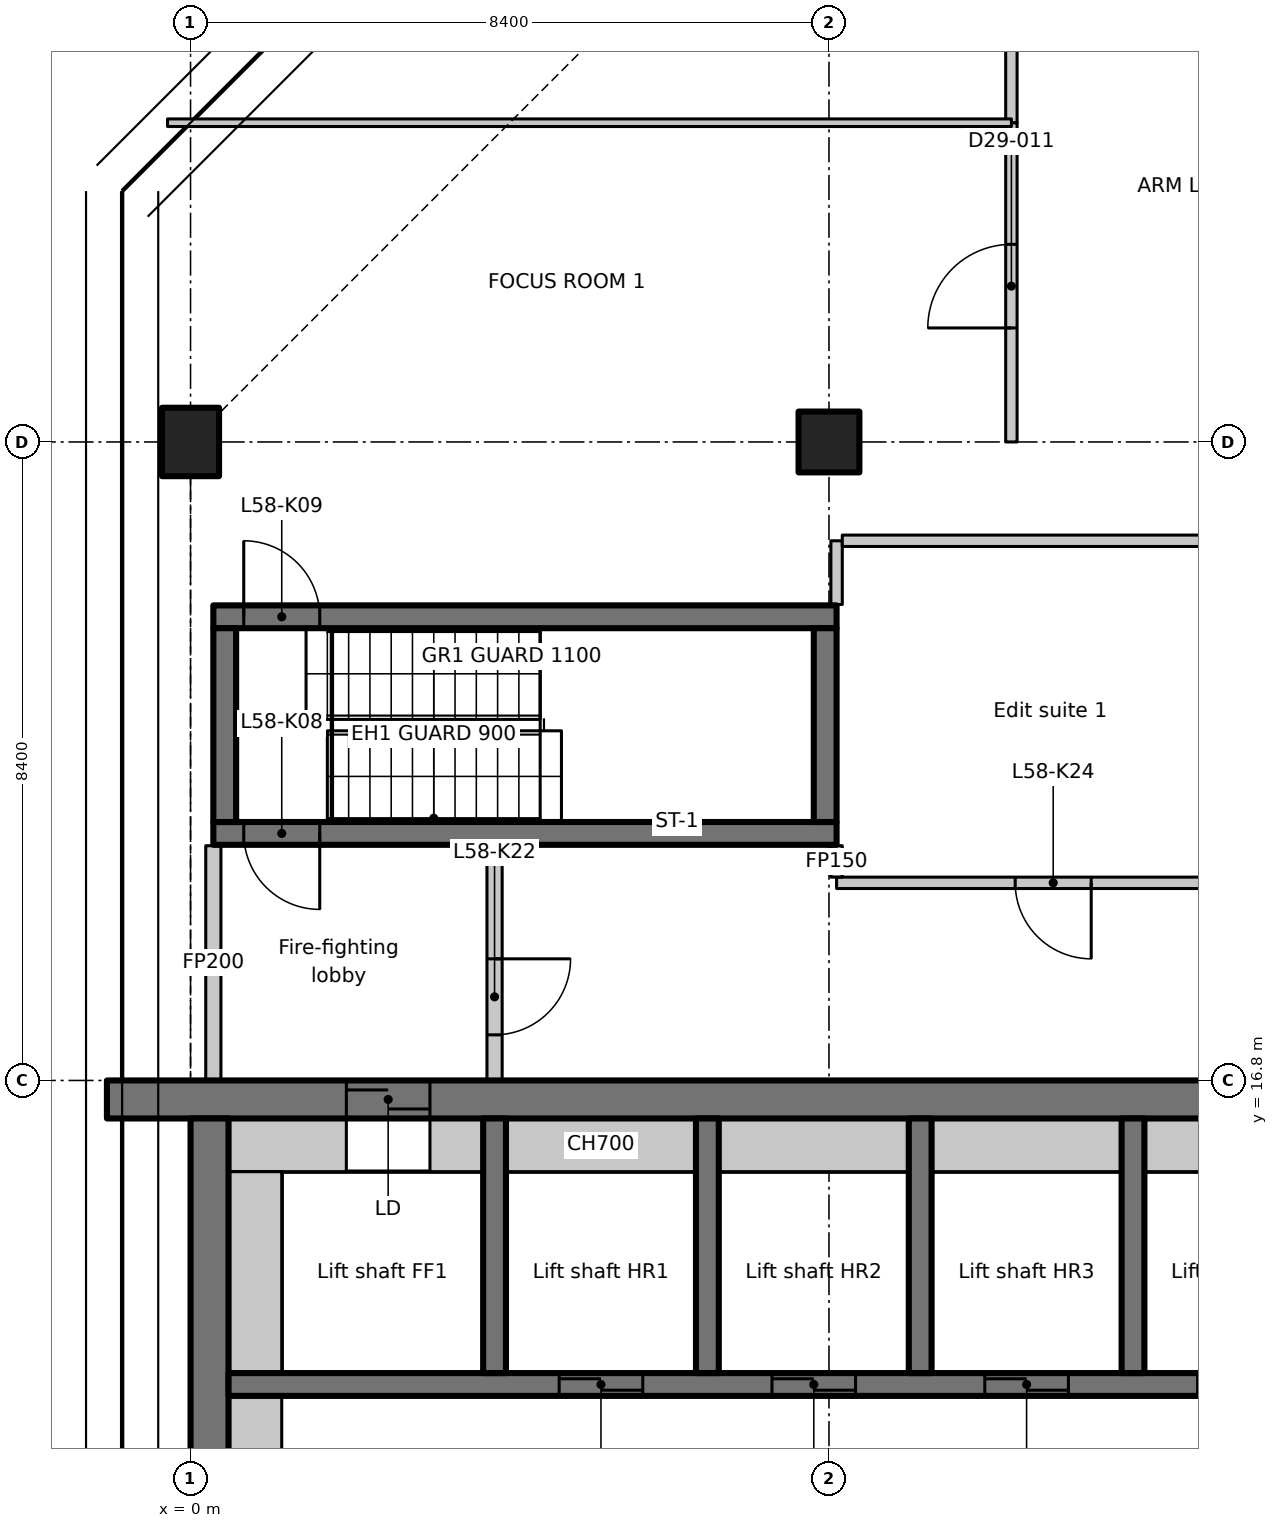
"""IFC4 building model, lengths in metres.
Left out: names, types, materials, properties, quantities, classifications, styles, units other than length and angle.
Written with IfcOpenShell. Run it as: python <this file> out.ifc"""

import sys

from ifc_helpers import new_model, si_unit, direction, frame, frame_2d, origin, origin_2d, place, context, subcontext, project, spatial, polyline, rectangle, outline, extrude, element, fill, save


model = new_model("IFC4")
c1 = context("Model", 3, precision=1e-05, world=origin(), true_north=direction((0.0, 1.0)))
c2 = subcontext(c1, "Body", "Model", "MODEL_VIEW")
j1 = project(units=[si_unit("LENGTHUNIT", "METRE"), si_unit("PLANEANGLEUNIT", "RADIAN")], contexts=[c1])
p1 = place(None, origin())
s1 = spatial("IfcSite", under=j1, at=p1, CompositionType="ELEMENT")
p2 = place(p1, origin())
s2 = spatial("IfcBuilding", under=s1, at=p2, CompositionType="ELEMENT")
p3 = place(p2, frame((0.0, 0.0, 230.1)))
s3 = spatial("IfcBuildingStorey", under=s2, at=p3, CompositionType="ELEMENT", Elevation=230.1)
p4 = place(p3, frame((0.0, 25.2, 0.0), z_axis=(0.0, 0.0, 1.0), x_axis=(1.0, 0.0, 0.0)))
e1 = element("IfcColumn", 1, at=p4, inside=s3, PredefinedType="COLUMN", context=c2, shape_type="SweptSolid", body=[
    extrude(rectangle(XDim=0.75, YDim=0.9, at=origin_2d()), origin(), (0.0, 0.0, 1.0), 3.35),
])
p5 = place(p3, frame((8.4, 25.2, 0.0), z_axis=(0.0, 0.0, 1.0), x_axis=(1.0, 0.0, 0.0)))
e2 = element("IfcColumn", 2, at=p5, inside=s3, PredefinedType="COLUMN", context=c2, shape_type="SweptSolid", body=[
    extrude(rectangle(XDim=0.8, YDim=0.8, at=origin_2d()), origin(), (0.0, 0.0, 1.0), 3.35),
])
p6 = place(p3, frame((-1.1, 16.55, 0.0), z_axis=(0.0, 0.0, 1.0), x_axis=(1.0, 0.0, 0.0)))
e3 = element("IfcWall", 3, at=p6, inside=s3, PredefinedType="SHEAR", context=c2, shape_type="SweptSolid", body=[
    extrude(rectangle(XDim=22.1, YDim=0.5, at=frame_2d((11.05, 0.0))), origin(), (0.0, 0.0, 1.0), 3.35),
])
p7 = place(p6, frame((3.15, 0.0, 0.0)))
e4 = element("IfcOpeningElement", 4, at=p7, cuts=e3, PredefinedType="OPENING", context=c2, shape_type="SweptSolid", body=[
    extrude(rectangle(XDim=1.1, YDim=2.3, at=frame_2d((0.55, 1.15))), frame((0.0, 0.26, 0.0), z_axis=(0.0, -1.0, 0.0), x_axis=(1.0, 0.0, 0.0)), (0.0, 0.0, 1.0), 0.52),
])
p8 = place(p3, frame((0.25, 7.436, 0.0), z_axis=(0.0, 0.0, 1.0), x_axis=(0.0, 1.0, 0.0)))
e5 = element("IfcWall", 5, at=p8, inside=s3, PredefinedType="SHEAR", context=c2, shape_type="SweptSolid", body=[
    extrude(rectangle(XDim=8.864, YDim=0.5, at=frame_2d((4.432, 0.0))), origin(), (0.0, 0.0, 1.0), 3.35),
])
p9 = place(p3, frame((0.5, 15.95, 0.0), z_axis=(0.0, 0.0, 1.0), x_axis=(1.0, 0.0, 0.0)))
e6 = element("IfcWall", 6, at=p9, inside=s3, PredefinedType="PARTITIONING", context=c2, shape_type="SweptSolid", body=[
    extrude(rectangle(XDim=1.55, YDim=0.7, at=frame_2d((0.775, 0.0))), origin(), (0.0, 0.0, 1.0), 3.35),
])
p10 = place(p3, frame((0.5, 12.8, 0.0), z_axis=(0.0, 0.0, 1.0), x_axis=(1.0, 0.0, 0.0)))
e7 = element("IfcWall", 7, at=p10, inside=s3, PredefinedType="SHEAR", context=c2, shape_type="SweptSolid", body=[
    extrude(rectangle(XDim=14.85, YDim=0.3, at=frame_2d((7.425, 0.0))), origin(), (0.0, 0.0, 1.0), 3.35),
])
p11 = place(p10, frame((4.35, 0.0, 0.0)))
e8 = element("IfcOpeningElement", 8, at=p11, cuts=e7, PredefinedType="OPENING", context=c2, shape_type="SweptSolid", body=[
    extrude(rectangle(XDim=1.1, YDim=2.3, at=frame_2d((0.55, 1.15))), frame((0.0, 0.16, 0.0), z_axis=(0.0, -1.0, 0.0), x_axis=(1.0, 0.0, 0.0)), (0.0, 0.0, 1.0), 0.32),
])
p12 = place(p10, frame((7.15, 0.0, 0.0)))
e9 = element("IfcOpeningElement", 9, at=p12, cuts=e7, PredefinedType="OPENING", context=c2, shape_type="SweptSolid", body=[
    extrude(rectangle(XDim=1.1, YDim=2.3, at=frame_2d((0.55, 1.15))), frame((0.0, 0.16, 0.0), z_axis=(0.0, -1.0, 0.0), x_axis=(1.0, 0.0, 0.0)), (0.0, 0.0, 1.0), 0.32),
])
p13 = place(p10, frame((9.95, 0.0, 0.0)))
e10 = element("IfcOpeningElement", 10, at=p13, cuts=e7, PredefinedType="OPENING", context=c2, shape_type="SweptSolid", body=[
    extrude(rectangle(XDim=1.1, YDim=2.3, at=frame_2d((0.55, 1.15))), frame((0.0, 0.16, 0.0), z_axis=(0.0, -1.0, 0.0), x_axis=(1.0, 0.0, 0.0)), (0.0, 0.0, 1.0), 0.32),
])
p14 = place(p10, frame((12.75, 0.0, 0.0)))
e11 = element("IfcOpeningElement", 11, at=p14, cuts=e7, PredefinedType="OPENING", context=c2, shape_type="SweptSolid", body=[
    extrude(rectangle(XDim=1.1, YDim=2.3, at=frame_2d((0.55, 1.15))), frame((0.0, 0.16, 0.0), z_axis=(0.0, -1.0, 0.0), x_axis=(1.0, 0.0, 0.0)), (0.0, 0.0, 1.0), 0.32),
])
for number, where, z_axis, x_axis in (
    (12, (4.0, 12.95, 0.0), (0.0, 0.0, 1.0), (0.0, 1.0, 0.0)),
    (13, (6.8, 12.95, 0.0), (0.0, 0.0, 1.0), (0.0, 1.0, 0.0)),
    (14, (9.6, 12.95, 0.0), (0.0, 0.0, 1.0), (0.0, 1.0, 0.0)),
    (15, (12.4, 12.95, 0.0), (0.0, 0.0, 1.0), (0.0, 1.0, 0.0)),
):
    element("IfcWall", number, at=place(p3, frame(where, z_axis=z_axis, x_axis=x_axis)), inside=s3, PredefinedType="SHEAR", context=c2, shape_type="SweptSolid", body=[
        extrude(rectangle(XDim=3.35, YDim=0.3, at=frame_2d((1.675, 0.0))), origin(), (0.0, 0.0, 1.0), 3.35),
    ])
p15 = place(p3, frame((8.5, 20.05, 0.0), z_axis=(0.0, 0.0, 1.0), x_axis=(-1.0, 0.0, 0.0)))
e16 = element("IfcWall", 16, at=p15, inside=s3, PredefinedType="SHEAR", context=c2, shape_type="SweptSolid", body=[
    extrude(rectangle(XDim=8.2, YDim=0.3, at=frame_2d((4.1, 0.0))), origin(), (0.0, 0.0, 1.0), 3.35),
])
p16 = place(p15, frame((6.8, 0.0, 0.0)))
e17 = element("IfcOpeningElement", 17, at=p16, cuts=e16, PredefinedType="OPENING", context=c2, shape_type="SweptSolid", body=[
    extrude(rectangle(XDim=1.0, YDim=2.1, at=frame_2d((0.5, 1.05))), frame((0.0, 0.16, 0.0), z_axis=(0.0, -1.0, 0.0), x_axis=(1.0, 0.0, 0.0)), (0.0, 0.0, 1.0), 0.32),
])
p17 = place(p3, frame((0.3, 22.9, 0.0), z_axis=(0.0, 0.0, 1.0), x_axis=(1.0, 0.0, 0.0)))
e18 = element("IfcWall", 18, at=p17, inside=s3, PredefinedType="SHEAR", context=c2, shape_type="SweptSolid", body=[
    extrude(rectangle(XDim=8.2, YDim=0.3, at=frame_2d((4.1, 0.0))), origin(), (0.0, 0.0, 1.0), 3.35),
])
p18 = place(p17, frame((0.4, 0.0, 0.0)))
e19 = element("IfcOpeningElement", 19, at=p18, cuts=e18, PredefinedType="OPENING", context=c2, shape_type="SweptSolid", body=[
    extrude(rectangle(XDim=1.0, YDim=2.1, at=frame_2d((0.5, 1.05))), frame((0.0, 0.16, 0.0), z_axis=(0.0, -1.0, 0.0), x_axis=(1.0, 0.0, 0.0)), (0.0, 0.0, 1.0), 0.32),
])
for number, where, z_axis, x_axis in (
    (20, (0.45, 20.2, 0.0), (0.0, 0.0, 1.0), (0.0, 1.0, 0.0)),
    (21, (8.35, 20.2, 0.0), (0.0, 0.0, 1.0), (0.0, 1.0, 0.0)),
):
    element("IfcWall", number, at=place(p3, frame(where, z_axis=z_axis, x_axis=x_axis)), inside=s3, PredefinedType="SHEAR", context=c2, shape_type="SweptSolid", body=[
        extrude(rectangle(XDim=2.55, YDim=0.3, at=frame_2d((1.275, 0.0))), origin(), (0.0, 0.0, 1.0), 3.35),
    ])
p19 = place(p3, frame((0.3, 16.812, 0.0), z_axis=(0.0, 0.0, 1.0), x_axis=(0.0, 1.0, 0.0)))
e22 = element("IfcWall", 22, at=p19, inside=s3, PredefinedType="PARTITIONING", context=c2, shape_type="SweptSolid", body=[
    extrude(rectangle(XDim=3.076, YDim=0.2, at=frame_2d((1.538, 0.0))), origin(), (0.0, 0.0, 1.0), 2.98),
])
p20 = place(p3, frame((4.0, 19.888, 0.0), z_axis=(0.0, 0.0, 1.0), x_axis=(0.0, -1.0, 0.0)))
e23 = element("IfcWall", 23, at=p20, inside=s3, PredefinedType="PARTITIONING", context=c2, shape_type="SweptSolid", body=[
    extrude(rectangle(XDim=3.076, YDim=0.2, at=frame_2d((1.538, 0.0))), origin(), (0.0, 0.0, 1.0), 3.35),
])
p21 = place(p20, frame((1.488, 0.0, 0.0)))
e24 = element("IfcOpeningElement", 24, at=p21, cuts=e23, PredefinedType="OPENING", context=c2, shape_type="SweptSolid", body=[
    extrude(rectangle(XDim=1.0, YDim=2.1, at=frame_2d((0.5, 1.05))), frame((0.0, 0.11, 0.0), z_axis=(0.0, -1.0, 0.0), x_axis=(1.0, 0.0, 0.0)), (0.0, 0.0, 1.0), 0.22),
])
p22 = place(p3, frame((14.2, 19.4, 0.0), z_axis=(0.0, 0.0, 1.0), x_axis=(-1.0, 0.0, 0.0)))
e25 = element("IfcWall", 25, at=p22, inside=s3, PredefinedType="PARTITIONING", context=c2, shape_type="SweptSolid", body=[
    extrude(rectangle(XDim=5.7, YDim=0.15, at=frame_2d((2.85, 0.0))), origin(), (0.0, 0.0, 1.0), 3.35),
])
p23 = place(p22, frame((2.35, 0.0, 0.0)))
e26 = element("IfcOpeningElement", 26, at=p23, cuts=e25, PredefinedType="OPENING", context=c2, shape_type="SweptSolid", body=[
    extrude(rectangle(XDim=1.0, YDim=2.1, at=frame_2d((0.5, 1.05))), frame((0.0, 0.085, 0.0), z_axis=(0.0, -1.0, 0.0), x_axis=(1.0, 0.0, 0.0)), (0.0, 0.0, 1.0), 0.17),
])
p24 = place(p3, frame((8.5, 19.475, 0.0), z_axis=(0.0, 0.0, 1.0), x_axis=(0.0, 1.0, 0.0)))
e27 = element("IfcWall", 27, at=p24, inside=s3, PredefinedType="PARTITIONING", context=c2, shape_type="SweptSolid", body=[
    extrude(rectangle(XDim=0.413, YDim=0.15, at=frame_2d((0.207, 0.0))), origin(), (0.0, 0.0, 1.0), 3.35),
])
p25 = place(p3, frame((8.5, 23.062, 0.0), z_axis=(0.0, 0.0, 1.0), x_axis=(0.0, 1.0, 0.0)))
e28 = element("IfcWall", 28, at=p25, inside=s3, PredefinedType="PARTITIONING", context=c2, shape_type="SweptSolid", body=[
    extrude(rectangle(XDim=0.838, YDim=0.15, at=frame_2d((0.419, 0.0))), origin(), (0.0, 0.0, 1.0), 3.35),
])
p26 = place(p3, frame((8.575, 23.9, 0.0), z_axis=(0.0, 0.0, 1.0), x_axis=(1.0, 0.0, 0.0)))
e29 = element("IfcWall", 29, at=p26, inside=s3, PredefinedType="PARTITIONING", context=c2, shape_type="SweptSolid", body=[
    extrude(rectangle(XDim=5.625, YDim=0.15, at=frame_2d((2.812, 0.0))), origin(), (0.0, 0.0, 1.0), 3.35),
])
p27 = place(p3, frame((0.85, 7.436, 0.0), z_axis=(0.0, 0.0, 1.0), x_axis=(0.0, 1.0, 0.0)))
e30 = element("IfcWall", 30, at=p27, inside=s3, PredefinedType="PARTITIONING", context=c2, shape_type="SweptSolid", body=[
    extrude(rectangle(XDim=5.214, YDim=0.7, at=frame_2d((2.607, 0.0))), origin(), (0.0, 0.0, 1.0), 3.35),
])
p28 = place(p3, frame((0.85, 12.95, 0.0), z_axis=(0.0, 0.0, 1.0), x_axis=(0.0, 1.0, 0.0)))
e31 = element("IfcWall", 31, at=p28, inside=s3, PredefinedType="PARTITIONING", context=c2, shape_type="SweptSolid", body=[
    extrude(rectangle(XDim=2.65, YDim=0.7, at=frame_2d((1.325, 0.0))), origin(), (0.0, 0.0, 1.0), 3.35),
])
p29 = place(p3, frame((3.15, 15.95, 0.0), z_axis=(0.0, 0.0, 1.0), x_axis=(1.0, 0.0, 0.0)))
e32 = element("IfcWall", 32, at=p29, inside=s3, PredefinedType="PARTITIONING", context=c2, shape_type="SweptSolid", body=[
    extrude(rectangle(XDim=0.7, YDim=0.7, at=frame_2d((0.35, 0.0))), origin(), (0.0, 0.0, 1.0), 3.35),
])
for number, where, z_axis, x_axis in (
    (33, (4.15, 15.95, 0.0), (0.0, 0.0, 1.0), (1.0, 0.0, 0.0)),
    (34, (6.95, 15.95, 0.0), (0.0, 0.0, 1.0), (1.0, 0.0, 0.0)),
    (35, (9.75, 15.95, 0.0), (0.0, 0.0, 1.0), (1.0, 0.0, 0.0)),
    (36, (12.55, 15.95, 0.0), (0.0, 0.0, 1.0), (1.0, 0.0, 0.0)),
):
    element("IfcWall", number, at=place(p3, frame(where, z_axis=z_axis, x_axis=x_axis)), inside=s3, PredefinedType="PARTITIONING", context=c2, shape_type="SweptSolid", body=[
        extrude(rectangle(XDim=2.5, YDim=0.7, at=frame_2d((1.25, 0.0))), origin(), (0.0, 0.0, 1.0), 3.35),
    ])
p30 = place(p3, frame((10.8, 25.2, 0.0), z_axis=(0.0, 0.0, 1.0), x_axis=(0.0, 1.0, 0.0)))
e37 = element("IfcWall", 37, at=p30, inside=s3, PredefinedType="PARTITIONING", context=c2, shape_type="SweptSolid", body=[
    extrude(rectangle(XDim=4.2, YDim=0.15, at=frame_2d((2.1, 0.0))), origin(), (0.0, 0.0, 1.0), 3.33),
])
p31 = place(p30, frame((1.5, 0.0, 0.0)))
e38 = element("IfcOpeningElement", 38, at=p31, cuts=e37, PredefinedType="OPENING", context=c2, shape_type="SweptSolid", body=[
    extrude(rectangle(XDim=1.1, YDim=2.1, at=frame_2d((0.55, 1.05))), frame((0.0, 0.085, 0.0), z_axis=(0.0, -1.0, 0.0), x_axis=(1.0, 0.0, 0.0)), (0.0, 0.0, 1.0), 0.17),
])
p32 = place(p3, frame((10.8, 29.4, 0.0), z_axis=(0.0, 0.0, 1.0), x_axis=(0.0, 1.0, 0.0)))
e39 = element("IfcWall", 39, at=p32, inside=s3, PredefinedType="PARTITIONING", context=c2, shape_type="SweptSolid", body=[
    extrude(rectangle(XDim=4.2, YDim=0.15, at=frame_2d((2.1, 0.0))), origin(), (0.0, 0.0, 1.0), 2.98),
])
p33 = place(p32, frame((1.5, 0.0, 0.0)))
e40 = element("IfcOpeningElement", 40, at=p33, cuts=e39, PredefinedType="OPENING", context=c2, shape_type="SweptSolid", body=[
    extrude(rectangle(XDim=1.1, YDim=2.1, at=frame_2d((0.55, 1.05))), frame((0.0, 0.085, 0.0), z_axis=(0.0, -1.0, 0.0), x_axis=(1.0, 0.0, 0.0)), (0.0, 0.0, 1.0), 0.17),
])
p34 = place(p3, frame((-0.302, 29.4, 0.0), z_axis=(0.0, 0.0, 1.0), x_axis=(1.0, 0.0, 0.0)))
e41 = element("IfcWall", 41, at=p34, inside=s3, PredefinedType="PARTITIONING", context=c2, shape_type="SweptSolid", body=[
    extrude(outline(polyline([(0.0, 0.0), (11.103, 0.0), (11.103, 3.33), (5.168, 3.33), (5.166, 2.98), (3.839, 2.98), (3.837, 3.33), (0.103, 3.33), (0.0, 3.33), (0.0, 0.0)])), frame((0.0, 0.05, 0.0), z_axis=(0.0, -1.0, 0.0), x_axis=(1.0, 0.0, 0.0)), (0.0, 0.0, 1.0), 0.1),
])
p35 = place(p7, origin())
e42 = element("IfcDoor", 42, at=p35, inside=s3, OperationType="SLIDING_TO_LEFT", PredefinedType="DOOR", context=c2, shape_type="SweptSolid", body=[
    extrude(rectangle(XDim=1.1, YDim=2.3, at=frame_2d((0.55, 1.15))), frame((0.0, 0.025, 0.0), z_axis=(0.0, -1.0, 0.0), x_axis=(1.0, 0.0, 0.0)), (0.0, 0.0, 1.0), 0.05),
])
fill(e4, e42)
p36 = place(p11, origin())
e43 = element("IfcDoor", 43, at=p36, inside=s3, OperationType="SLIDING_TO_LEFT", PredefinedType="DOOR", context=c2, shape_type="SweptSolid", body=[
    extrude(rectangle(XDim=1.1, YDim=2.3, at=frame_2d((0.55, 1.15))), frame((0.0, 0.025, 0.0), z_axis=(0.0, -1.0, 0.0), x_axis=(1.0, 0.0, 0.0)), (0.0, 0.0, 1.0), 0.05),
])
fill(e8, e43)
p37 = place(p12, origin())
e44 = element("IfcDoor", 44, at=p37, inside=s3, OperationType="SLIDING_TO_LEFT", PredefinedType="DOOR", context=c2, shape_type="SweptSolid", body=[
    extrude(rectangle(XDim=1.1, YDim=2.3, at=frame_2d((0.55, 1.15))), frame((0.0, 0.025, 0.0), z_axis=(0.0, -1.0, 0.0), x_axis=(1.0, 0.0, 0.0)), (0.0, 0.0, 1.0), 0.05),
])
fill(e9, e44)
p38 = place(p13, origin())
e45 = element("IfcDoor", 45, at=p38, inside=s3, OperationType="SLIDING_TO_LEFT", PredefinedType="DOOR", context=c2, shape_type="SweptSolid", body=[
    extrude(rectangle(XDim=1.1, YDim=2.3, at=frame_2d((0.55, 1.15))), frame((0.0, 0.025, 0.0), z_axis=(0.0, -1.0, 0.0), x_axis=(1.0, 0.0, 0.0)), (0.0, 0.0, 1.0), 0.05),
])
fill(e10, e45)
p39 = place(p16, origin())
e46 = element("IfcDoor", 46, at=p39, inside=s3, OperationType="SINGLE_SWING_LEFT", PredefinedType="DOOR", context=c2, shape_type="SweptSolid", body=[
    extrude(rectangle(XDim=1.0, YDim=2.1, at=frame_2d((0.5, 1.05))), frame((0.0, 0.025, 0.0), z_axis=(0.0, -1.0, 0.0), x_axis=(1.0, 0.0, 0.0)), (0.0, 0.0, 1.0), 0.05),
])
fill(e17, e46)
p40 = place(p18, origin())
e47 = element("IfcDoor", 47, at=p40, inside=s3, OperationType="SINGLE_SWING_RIGHT", PredefinedType="DOOR", context=c2, shape_type="SweptSolid", body=[
    extrude(rectangle(XDim=1.0, YDim=2.1, at=frame_2d((0.5, 1.05))), frame((0.0, 0.025, 0.0), z_axis=(0.0, -1.0, 0.0), x_axis=(1.0, 0.0, 0.0)), (0.0, 0.0, 1.0), 0.05),
])
fill(e19, e47)
p41 = place(p21, origin())
e48 = element("IfcDoor", 48, at=p41, inside=s3, OperationType="SINGLE_SWING_LEFT", PredefinedType="DOOR", context=c2, shape_type="SweptSolid", body=[
    extrude(rectangle(XDim=1.0, YDim=2.1, at=frame_2d((0.5, 1.05))), frame((0.0, 0.025, 0.0), z_axis=(0.0, -1.0, 0.0), x_axis=(1.0, 0.0, 0.0)), (0.0, 0.0, 1.0), 0.05),
])
fill(e24, e48)
p42 = place(p23, origin())
e49 = element("IfcDoor", 49, at=p42, inside=s3, OperationType="SINGLE_SWING_LEFT", PredefinedType="DOOR", context=c2, shape_type="SweptSolid", body=[
    extrude(rectangle(XDim=1.0, YDim=2.1, at=frame_2d((0.5, 1.05))), frame((0.0, 0.025, 0.0), z_axis=(0.0, -1.0, 0.0), x_axis=(1.0, 0.0, 0.0)), (0.0, 0.0, 1.0), 0.05),
])
fill(e26, e49)
p43 = place(p31, origin())
e50 = element("IfcDoor", 50, at=p43, inside=s3, OperationType="SINGLE_SWING_LEFT", PredefinedType="DOOR", context=c2, shape_type="SweptSolid", body=[
    extrude(rectangle(XDim=1.1, YDim=2.1, at=frame_2d((0.55, 1.05))), frame((0.0, 0.025, 0.0), z_axis=(0.0, -1.0, 0.0), x_axis=(1.0, 0.0, 0.0)), (0.0, 0.0, 1.0), 0.05),
])
fill(e38, e50)
save(model, sys.argv[1])
